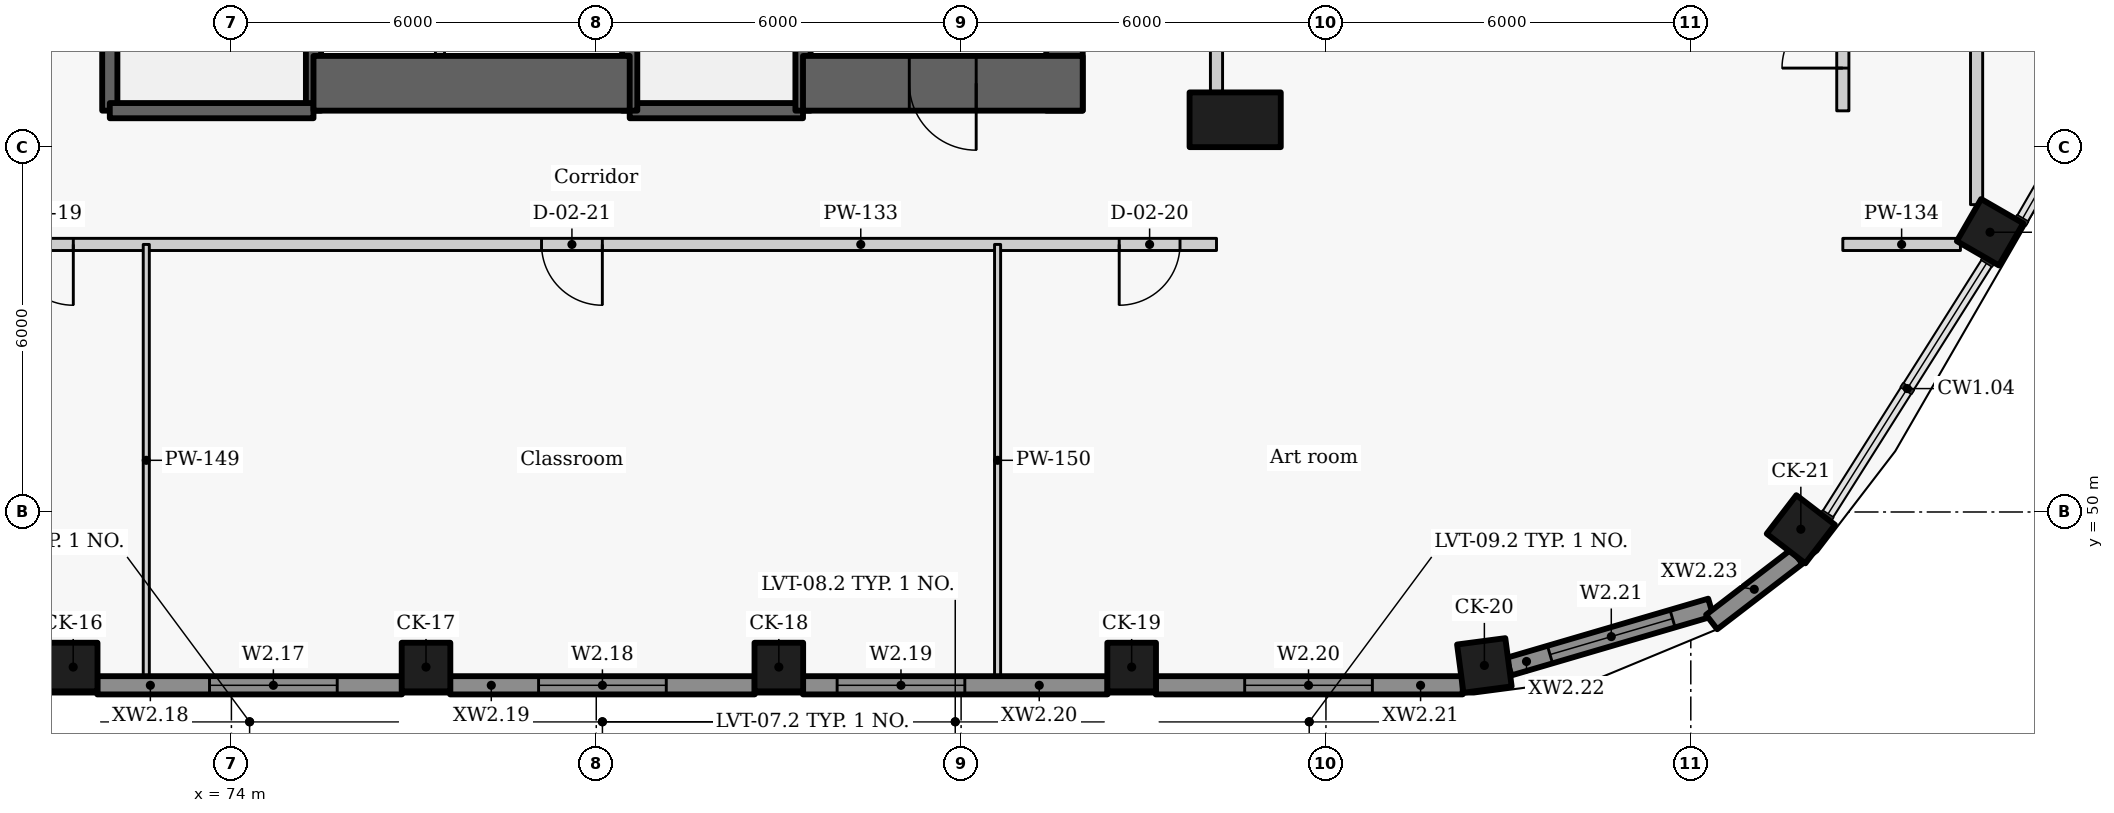
"""IFC4 building model, lengths in metres.
Left out: names, types, materials, properties, quantities, classifications, styles, units other than length and angle.
Written with IfcOpenShell. Run it as: python <this file> out.ifc"""

import sys

from ifc_helpers import new_model, si_unit, direction, frame, frame_2d, origin, origin_2d, place, context, subcontext, project, spatial, rectangle, extrude, element, fill, save


model = new_model("IFC4")
c1 = context("Model", 3, precision=1e-05, world=origin(), true_north=direction((0.0, 1.0)))
c2 = subcontext(c1, "Body", "Model", "MODEL_VIEW")
j1 = project(units=[si_unit("LENGTHUNIT", "METRE"), si_unit("PLANEANGLEUNIT", "RADIAN")], contexts=[c1])
p1 = place(None, origin())
s1 = spatial("IfcSite", under=j1, at=p1, CompositionType="ELEMENT")
p2 = place(p1, origin())
s2 = spatial("IfcBuilding", under=s1, at=p2, CompositionType="ELEMENT")
p3 = place(p2, frame((0.0, 0.0, 11.4)))
s3 = spatial("IfcBuildingStorey", under=s2, at=p3, CompositionType="ELEMENT", Elevation=11.4)
p4 = place(p3, frame((90.507, 56.45, 0.0), z_axis=(0.0, 0.0, 1.0), x_axis=(1.0, 0.0, 0.0)))
e1 = element("IfcColumn", 1, at=p4, inside=s3, PredefinedType="COLUMN", context=c2, shape_type="SweptSolid", body=[
    extrude(rectangle(XDim=1.5, YDim=0.9, at=origin_2d()), origin(), (0.0, 0.0, 1.0), 4.2),
])
for number, where, z_axis, x_axis in (
    (2, (71.398, 47.45, 0.0), (0.0, 0.0, 1.0), (1.0, 0.0, 0.0)),
    (3, (77.2, 47.45, 0.0), (0.0, 0.0, 1.0), (1.0, 0.0, 0.0)),
    (4, (83.002, 47.45, 0.0), (0.0, 0.0, 1.0), (1.0, 0.0, 0.0)),
    (5, (88.805, 47.45, 0.0), (0.0, 0.0, 1.0), (1.0, 0.0, 0.0)),
    (6, (94.605, 47.477, 0.0), (0.0, 0.0, 1.0), (0.991, 0.131, 0.0)),
    (7, (99.81, 49.716, 0.0), (0.0, 0.0, 1.0), (0.609, 0.793, 0.0)),
    (8, (102.921, 54.6, 0.0), (0.0, 0.0, 1.0), (0.5, 0.866, 0.0)),
):
    element("IfcColumn", number, at=place(p3, frame(where, z_axis=z_axis, x_axis=x_axis)), inside=s3, PredefinedType="COLUMN", context=c2, shape_type="SweptSolid", body=[
        extrude(rectangle(XDim=0.8, YDim=0.8, at=origin_2d()), origin(), (0.0, 0.0, 1.0), 4.2),
    ])
p5 = place(p3, frame((71.794, 47.15, 0.0), z_axis=(0.0, 0.0, 1.0), x_axis=(1.0, 0.0, 0.0)))
e9 = element("IfcWall", 9, at=p5, inside=s3, PredefinedType="SOLIDWALL", context=c2, shape_type="SweptSolid", body=[
    extrude(rectangle(XDim=5.01, YDim=0.3, at=frame_2d((2.505, 0.0))), origin(), (0.0, 0.0, 1.0), 3.0),
])
p6 = place(p5, frame((1.846, 0.0, 0.9)))
e10 = element("IfcOpeningElement", 10, at=p6, cuts=e9, PredefinedType="OPENING", context=c2, shape_type="SweptSolid", body=[
    extrude(rectangle(XDim=2.1, YDim=2.05, at=frame_2d((1.05, 1.025))), frame((0.0, 0.16, 0.0), z_axis=(0.0, -1.0, 0.0), x_axis=(1.0, 0.0, 0.0)), (0.0, 0.0, 1.0), 0.32),
])
p7 = place(p3, frame((77.596, 47.15, 0.0), z_axis=(0.0, 0.0, 1.0), x_axis=(1.0, 0.0, 0.0)))
e11 = element("IfcWall", 11, at=p7, inside=s3, PredefinedType="SOLIDWALL", context=c2, shape_type="SweptSolid", body=[
    extrude(rectangle(XDim=5.01, YDim=0.3, at=frame_2d((2.505, 0.0))), origin(), (0.0, 0.0, 1.0), 3.0),
])
p8 = place(p7, frame((1.455, 0.0, 0.9)))
e12 = element("IfcOpeningElement", 12, at=p8, cuts=e11, PredefinedType="OPENING", context=c2, shape_type="SweptSolid", body=[
    extrude(rectangle(XDim=2.1, YDim=2.05, at=frame_2d((1.05, 1.025))), frame((0.0, 0.16, 0.0), z_axis=(0.0, -1.0, 0.0), x_axis=(1.0, 0.0, 0.0)), (0.0, 0.0, 1.0), 0.32),
])
p9 = place(p3, frame((83.398, 47.15, 0.0), z_axis=(0.0, 0.0, 1.0), x_axis=(1.0, 0.0, 0.0)))
e13 = element("IfcWall", 13, at=p9, inside=s3, PredefinedType="SOLIDWALL", context=c2, shape_type="SweptSolid", body=[
    extrude(rectangle(XDim=5.01, YDim=0.3, at=frame_2d((2.505, 0.0))), origin(), (0.0, 0.0, 1.0), 3.0),
])
p10 = place(p9, frame((0.563, 0.0, 0.9)))
e14 = element("IfcOpeningElement", 14, at=p10, cuts=e13, PredefinedType="OPENING", context=c2, shape_type="SweptSolid", body=[
    extrude(rectangle(XDim=2.1, YDim=2.05, at=frame_2d((1.05, 1.025))), frame((0.0, 0.16, 0.0), z_axis=(0.0, -1.0, 0.0), x_axis=(1.0, 0.0, 0.0)), (0.0, 0.0, 1.0), 0.32),
])
p11 = place(p3, frame((89.201, 47.15, 0.0), z_axis=(0.0, 0.0, 1.0), x_axis=(1.0, 0.0, 0.0)))
e15 = element("IfcWall", 15, at=p11, inside=s3, PredefinedType="SOLIDWALL", context=c2, shape_type="SweptSolid", body=[
    extrude(rectangle(XDim=5.048, YDim=0.3, at=frame_2d((2.524, 0.0))), origin(), (0.0, 0.0, 1.0), 3.0),
])
p12 = place(p11, frame((1.463, 0.0, 0.9)))
e16 = element("IfcOpeningElement", 16, at=p12, cuts=e15, PredefinedType="OPENING", context=c2, shape_type="SweptSolid", body=[
    extrude(rectangle(XDim=2.1, YDim=2.05, at=frame_2d((1.05, 1.025))), frame((0.0, 0.16, 0.0), z_axis=(0.0, -1.0, 0.0), x_axis=(1.0, 0.0, 0.0)), (0.0, 0.0, 1.0), 0.32),
])
p13 = place(p3, frame((95.007, 47.457, 0.0), z_axis=(0.0, 0.0, 1.0), x_axis=(0.959578633815, 0.281440660756, 0.0)))
e17 = element("IfcWall", 17, at=p13, inside=s3, PredefinedType="SOLIDWALL", context=c2, shape_type="SweptSolid", body=[
    extrude(rectangle(XDim=3.461, YDim=0.3, at=frame_2d((1.73, 0.0))), origin(), (0.0, 0.0, 1.0), 3.0),
])
p14 = place(p13, frame((0.706, 0.0, 0.9)))
e18 = element("IfcOpeningElement", 18, at=p14, cuts=e17, PredefinedType="OPENING", context=c2, shape_type="SweptSolid", body=[
    extrude(rectangle(XDim=2.1, YDim=2.05, at=frame_2d((1.05, 1.025))), frame((0.0, 0.16, 0.0), z_axis=(0.0, -1.0, 0.0), x_axis=(1.0, 0.0, 0.0)), (0.0, 0.0, 1.0), 0.32),
])
p15 = place(p3, frame((98.343, 48.191, 0.0), z_axis=(0.0, 0.0, 1.0), x_axis=(0.793403972369, 0.608695438318, 0.0)))
e19 = element("IfcWall", 19, at=p15, inside=s3, PredefinedType="SOLIDWALL", context=c2, shape_type="SweptSolid", body=[
    extrude(rectangle(XDim=1.767, YDim=0.3, at=frame_2d((0.884, 0.0))), origin(), (0.0, 0.0, 1.0), 3.0),
])
p16 = place(p3, frame((87.7, 72.2, -0.3), z_axis=(0.0, 0.0, 1.0), x_axis=(0.0, -1.0, 0.0)))
e20 = element("IfcWall", 20, at=p16, inside=s3, PredefinedType="SHEAR", context=c2, shape_type="SweptSolid", body=[
    extrude(rectangle(XDim=15.6, YDim=0.6, at=frame_2d((7.8, 0.0))), origin(), (0.0, 0.0, 1.0), 4.2),
])
p17 = place(p16, frame((11.8, 0.0, 0.3)))
e21 = element("IfcOpeningElement", 21, at=p17, cuts=e20, PredefinedType="OPENING", context=c2, shape_type="SweptSolid", body=[
    extrude(rectangle(XDim=1.1, YDim=2.1, at=frame_2d((0.55, 1.05))), frame((0.0, 0.31, 0.0), z_axis=(0.0, -1.0, 0.0), x_axis=(1.0, 0.0, 0.0)), (0.0, 0.0, 1.0), 0.62),
])
p18 = place(p3, frame((75.35, 56.6, -0.3), z_axis=(0.0, 0.0, 1.0), x_axis=(0.0, 1.0, 0.0)))
e22 = element("IfcWall", 22, at=p18, inside=s3, PredefinedType="SHEAR", context=c2, shape_type="SweptSolid", body=[
    extrude(rectangle(XDim=5.003, YDim=0.25, at=frame_2d((2.501, 0.0))), origin(), (0.0, 0.0, 1.0), 4.2),
])
p19 = place(p3, frame((72.0, 56.6, -0.3), z_axis=(0.0, 0.0, 1.0), x_axis=(0.0, 1.0, 0.0)))
e23 = element("IfcWall", 23, at=p19, inside=s3, PredefinedType="SHEAR", context=c2, shape_type="SweptSolid", body=[
    extrude(rectangle(XDim=6.5, YDim=0.25, at=frame_2d((3.25, 0.0))), origin(), (0.0, 0.0, 1.0), 4.2),
])
p20 = place(p3, frame((72.0, 56.6, -0.3), z_axis=(0.0, 0.0, 1.0), x_axis=(1.0, 0.0, 0.0)))
e24 = element("IfcWall", 24, at=p20, inside=s3, PredefinedType="SHEAR", context=c2, shape_type="SweptSolid", body=[
    extrude(rectangle(XDim=3.35, YDim=0.25, at=frame_2d((1.675, 0.0))), origin(), (0.0, 0.0, 1.0), 4.2),
])
p21 = place(p3, frame((80.55, 56.6, -0.3), z_axis=(0.0, 0.0, 1.0), x_axis=(1.0, 0.0, 0.0)))
e25 = element("IfcWall", 25, at=p21, inside=s3, PredefinedType="SHEAR", context=c2, shape_type="SweptSolid", body=[
    extrude(rectangle(XDim=2.85, YDim=0.25, at=frame_2d((1.425, 0.0))), origin(), (0.0, 0.0, 1.0), 4.2),
])
p22 = place(p3, frame((83.4, 63.1, -0.3), z_axis=(0.0, 0.0, 1.0), x_axis=(0.0, -1.0, 0.0)))
e26 = element("IfcWall", 26, at=p22, inside=s3, PredefinedType="SHEAR", context=c2, shape_type="SweptSolid", body=[
    extrude(rectangle(XDim=6.5, YDim=0.25, at=frame_2d((3.25, 0.0))), origin(), (0.0, 0.0, 1.0), 4.2),
])
p23 = place(p22, frame((0.25, 0.0, 0.3)))
e27 = element("IfcOpeningElement", 27, at=p23, cuts=e26, PredefinedType="OPENING", context=c2, shape_type="SweptSolid", body=[
    extrude(rectangle(XDim=0.9, YDim=2.1, at=frame_2d((0.45, 1.05))), frame((0.0, 0.135, 0.0), z_axis=(0.0, -1.0, 0.0), x_axis=(1.0, 0.0, 0.0)), (0.0, 0.0, 1.0), 0.27),
])
p24 = place(p3, frame((80.55, 56.6, -0.3), z_axis=(0.0, 0.0, 1.0), x_axis=(0.0, 1.0, 0.0)))
e28 = element("IfcWall", 28, at=p24, inside=s3, PredefinedType="SHEAR", context=c2, shape_type="SweptSolid", body=[
    extrude(rectangle(XDim=5.003, YDim=0.25, at=frame_2d((2.501, 0.0))), origin(), (0.0, 0.0, 1.0), 4.2),
])
p25 = place(p3, frame((75.35, 57.05, -0.3), z_axis=(0.0, 0.0, 1.0), x_axis=(1.0, 0.0, 0.0)))
e29 = element("IfcWall", 29, at=p25, inside=s3, PredefinedType="SHEAR", context=c2, shape_type="SweptSolid", body=[
    extrude(rectangle(XDim=5.2, YDim=0.9, at=frame_2d((2.6, 0.0))), origin(), (0.0, 0.0, 1.0), 4.2),
])
p26 = place(p3, frame((88.0, 57.05, -0.3), z_axis=(0.0, 0.0, 1.0), x_axis=(-1.0, 0.0, 0.0)))
e30 = element("IfcWall", 30, at=p26, inside=s3, PredefinedType="SHEAR", context=c2, shape_type="SweptSolid", body=[
    extrude(rectangle(XDim=4.6, YDim=0.9, at=frame_2d((2.3, 0.0))), origin(), (0.0, 0.0, 1.0), 4.2),
])
p27 = place(p26, frame((1.752, 0.0, 0.3)))
e31 = element("IfcOpeningElement", 31, at=p27, cuts=e30, PredefinedType="OPENING", context=c2, shape_type="SweptSolid", body=[
    extrude(rectangle(XDim=1.1, YDim=2.1, at=frame_2d((0.55, 1.05))), frame((0.0, 0.46, 0.0), z_axis=(0.0, -1.0, 0.0), x_axis=(1.0, 0.0, 0.0)), (0.0, 0.0, 1.0), 0.92),
])
p28 = place(p3, frame((77.43, 56.6, 0.0), z_axis=(0.0, 0.0, 1.0), x_axis=(0.0, 1.0, 0.0)))
e32 = element("IfcWall", 32, at=p28, inside=s3, PredefinedType="PARTITIONING", context=c2, shape_type="SweptSolid", body=[
    extrude(rectangle(XDim=5.0, YDim=0.15, at=frame_2d((2.5, 0.0))), origin(), (0.0, 0.0, 1.0), 3.9),
])
p29 = place(p3, frame((102.7, 61.553, 0.0), z_axis=(0.0, 0.0, 1.0), x_axis=(0.0, -1.0, 0.0)))
e33 = element("IfcWall", 33, at=p29, inside=s3, PredefinedType="PARTITIONING", context=c2, shape_type="SweptSolid", body=[
    extrude(rectangle(XDim=6.499, YDim=0.2, at=frame_2d((3.249, 0.0))), origin(), (0.0, 0.0, 1.0), 3.9),
])
p30 = place(p29, frame((2.75, 0.0, 0.0)))
e34 = element("IfcOpeningElement", 34, at=p30, cuts=e33, PredefinedType="OPENING", context=c2, shape_type="SweptSolid", body=[
    extrude(rectangle(XDim=1.0, YDim=2.1, at=frame_2d((0.5, 1.05))), frame((0.0, 0.11, 0.0), z_axis=(0.0, -1.0, 0.0), x_axis=(1.0, 0.0, 0.0)), (0.0, 0.0, 1.0), 0.22),
])
p31 = place(p3, frame((100.5, 56.597, 0.0), z_axis=(0.0, 0.0, 1.0), x_axis=(0.0, 1.0, 0.0)))
e35 = element("IfcWall", 35, at=p31, inside=s3, PredefinedType="PARTITIONING", context=c2, shape_type="SweptSolid", body=[
    extrude(rectangle(XDim=10.873, YDim=0.2, at=frame_2d((5.437, 0.0))), origin(), (0.0, 0.0, 1.0), 3.9),
])
p32 = place(p31, frame((5.003, 0.0, 0.0)))
e36 = element("IfcOpeningElement", 36, at=p32, cuts=e35, PredefinedType="OPENING", context=c2, shape_type="SweptSolid", body=[
    extrude(rectangle(XDim=1.0, YDim=2.1, at=frame_2d((0.5, 1.05))), frame((0.0, 0.11, 0.0), z_axis=(0.0, -1.0, 0.0), x_axis=(1.0, 0.0, 0.0)), (0.0, 0.0, 1.0), 0.22),
])
p33 = place(p31, frame((0.703, 0.0, 0.0)))
e37 = element("IfcOpeningElement", 37, at=p33, cuts=e35, PredefinedType="OPENING", context=c2, shape_type="SweptSolid", body=[
    extrude(rectangle(XDim=1.0, YDim=2.1, at=frame_2d((0.5, 1.05))), frame((0.0, 0.11, 0.0), z_axis=(0.0, -1.0, 0.0), x_axis=(1.0, 0.0, 0.0)), (0.0, 0.0, 1.0), 0.22),
])
p34 = place(p3, frame((90.2, 56.917, 0.0), z_axis=(0.0, 0.0, 1.0), x_axis=(0.0, 1.0, 0.0)))
e38 = element("IfcWall", 38, at=p34, inside=s3, PredefinedType="PARTITIONING", context=c2, shape_type="SweptSolid", body=[
    extrude(rectangle(XDim=1.516, YDim=0.2, at=frame_2d((0.758, 0.0))), origin(), (0.0, 0.0, 1.0), 3.9),
])
p35 = place(p3, frame((90.2, 54.4, 0.0), z_axis=(0.0, 0.0, 1.0), x_axis=(-1.0, 0.0, 0.0)))
e39 = element("IfcWall", 39, at=p35, inside=s3, PredefinedType="PARTITIONING", context=c2, shape_type="SweptSolid", body=[
    extrude(rectangle(XDim=20.4, YDim=0.2, at=frame_2d((10.2, 0.0))), origin(), (0.0, 0.0, 1.0), 3.9),
])
p36 = place(p35, frame((18.8, 0.0, 0.0)))
e40 = element("IfcOpeningElement", 40, at=p36, cuts=e39, PredefinedType="OPENING", context=c2, shape_type="SweptSolid", body=[
    extrude(rectangle(XDim=1.0, YDim=2.1, at=frame_2d((0.5, 1.05))), frame((0.0, 0.11, 0.0), z_axis=(0.0, -1.0, 0.0), x_axis=(1.0, 0.0, 0.0)), (0.0, 0.0, 1.0), 0.22),
])
p37 = place(p35, frame((0.6, 0.0, 0.0)))
e41 = element("IfcOpeningElement", 41, at=p37, cuts=e39, PredefinedType="OPENING", context=c2, shape_type="SweptSolid", body=[
    extrude(rectangle(XDim=1.0, YDim=2.1, at=frame_2d((0.5, 1.05))), frame((0.0, 0.11, 0.0), z_axis=(0.0, -1.0, 0.0), x_axis=(1.0, 0.0, 0.0)), (0.0, 0.0, 1.0), 0.22),
])
p38 = place(p35, frame((10.1, 0.0, 0.0)))
e42 = element("IfcOpeningElement", 42, at=p38, cuts=e39, PredefinedType="OPENING", context=c2, shape_type="SweptSolid", body=[
    extrude(rectangle(XDim=1.0, YDim=2.1, at=frame_2d((0.5, 1.05))), frame((0.0, 0.11, 0.0), z_axis=(0.0, -1.0, 0.0), x_axis=(1.0, 0.0, 0.0)), (0.0, 0.0, 1.0), 0.22),
])
p39 = place(p3, frame((100.5, 54.4, 0.0), z_axis=(0.0, 0.0, 1.0), x_axis=(1.0, 0.0, 0.0)))
e43 = element("IfcWall", 43, at=p39, inside=s3, PredefinedType="PARTITIONING", context=c2, shape_type="SweptSolid", body=[
    extrude(rectangle(XDim=1.934, YDim=0.2, at=frame_2d((0.967, 0.0))), origin(), (0.0, 0.0, 1.0), 3.9),
])
for number, where, z_axis, x_axis in (
    (44, (72.6, 47.3, 0.0), (0.0, 0.0, 1.0), (0.0, 1.0, 0.0)),
    (45, (86.6, 47.3, 0.0), (0.0, 0.0, 1.0), (0.0, 1.0, 0.0)),
):
    element("IfcWall", number, at=place(p3, frame(where, z_axis=z_axis, x_axis=x_axis)), inside=s3, PredefinedType="PARTITIONING", context=c2, shape_type="SweptSolid", body=[
        extrude(rectangle(XDim=7.1, YDim=0.1, at=frame_2d((3.55, 0.0))), origin(), (0.0, 0.0, 1.0), 3.13),
    ])
p40 = place(p6, origin())
e46 = element("IfcWindow", 46, at=p40, inside=s3, PartitioningType="SINGLE_PANEL", PredefinedType="WINDOW", context=c2, shape_type="SweptSolid", body=[
    extrude(rectangle(XDim=2.1, YDim=2.05, at=frame_2d((1.05, 1.025))), frame((0.0, 0.03, 0.0), z_axis=(0.0, -1.0, 0.0), x_axis=(1.0, 0.0, 0.0)), (0.0, 0.0, 1.0), 0.06),
])
fill(e10, e46)
p41 = place(p8, origin())
e47 = element("IfcWindow", 47, at=p41, inside=s3, PartitioningType="SINGLE_PANEL", PredefinedType="WINDOW", context=c2, shape_type="SweptSolid", body=[
    extrude(rectangle(XDim=2.1, YDim=2.05, at=frame_2d((1.05, 1.025))), frame((0.0, 0.03, 0.0), z_axis=(0.0, -1.0, 0.0), x_axis=(1.0, 0.0, 0.0)), (0.0, 0.0, 1.0), 0.06),
])
fill(e12, e47)
p42 = place(p10, origin())
e48 = element("IfcWindow", 48, at=p42, inside=s3, PartitioningType="SINGLE_PANEL", PredefinedType="WINDOW", context=c2, shape_type="SweptSolid", body=[
    extrude(rectangle(XDim=2.1, YDim=2.05, at=frame_2d((1.05, 1.025))), frame((0.0, 0.03, 0.0), z_axis=(0.0, -1.0, 0.0), x_axis=(1.0, 0.0, 0.0)), (0.0, 0.0, 1.0), 0.06),
])
fill(e14, e48)
p43 = place(p12, origin())
e49 = element("IfcWindow", 49, at=p43, inside=s3, PartitioningType="SINGLE_PANEL", PredefinedType="WINDOW", context=c2, shape_type="SweptSolid", body=[
    extrude(rectangle(XDim=2.1, YDim=2.05, at=frame_2d((1.05, 1.025))), frame((0.0, 0.03, 0.0), z_axis=(0.0, -1.0, 0.0), x_axis=(1.0, 0.0, 0.0)), (0.0, 0.0, 1.0), 0.06),
])
fill(e16, e49)
p44 = place(p14, origin())
e50 = element("IfcWindow", 50, at=p44, inside=s3, PartitioningType="SINGLE_PANEL", PredefinedType="WINDOW", context=c2, shape_type="SweptSolid", body=[
    extrude(rectangle(XDim=2.1, YDim=2.05, at=frame_2d((1.05, 1.025))), frame((0.0, 0.03, 0.0), z_axis=(0.0, -1.0, 0.0), x_axis=(1.0, 0.0, 0.0)), (0.0, 0.0, 1.0), 0.06),
])
fill(e18, e50)
p45 = place(p33, origin())
e51 = element("IfcDoor", 51, at=p45, inside=s3, OperationType="SINGLE_SWING_LEFT", PredefinedType="DOOR", context=c2, shape_type="SweptSolid", body=[
    extrude(rectangle(XDim=1.0, YDim=2.1, at=frame_2d((0.5, 1.05))), frame((0.0, 0.025, 0.0), z_axis=(0.0, -1.0, 0.0), x_axis=(1.0, 0.0, 0.0)), (0.0, 0.0, 1.0), 0.05),
])
fill(e37, e51)
p46 = place(p36, origin())
e52 = element("IfcDoor", 52, at=p46, inside=s3, OperationType="SINGLE_SWING_LEFT", PredefinedType="DOOR", context=c2, shape_type="SweptSolid", body=[
    extrude(rectangle(XDim=1.0, YDim=2.1, at=frame_2d((0.5, 1.05))), frame((0.0, 0.025, 0.0), z_axis=(0.0, -1.0, 0.0), x_axis=(1.0, 0.0, 0.0)), (0.0, 0.0, 1.0), 0.05),
])
fill(e40, e52)
p47 = place(p37, origin())
e53 = element("IfcDoor", 53, at=p47, inside=s3, OperationType="SINGLE_SWING_RIGHT", PredefinedType="DOOR", context=c2, shape_type="SweptSolid", body=[
    extrude(rectangle(XDim=1.0, YDim=2.1, at=frame_2d((0.5, 1.05))), frame((0.0, 0.025, 0.0), z_axis=(0.0, -1.0, 0.0), x_axis=(1.0, 0.0, 0.0)), (0.0, 0.0, 1.0), 0.05),
])
fill(e41, e53)
p48 = place(p38, origin())
e54 = element("IfcDoor", 54, at=p48, inside=s3, OperationType="SINGLE_SWING_LEFT", PredefinedType="DOOR", context=c2, shape_type="SweptSolid", body=[
    extrude(rectangle(XDim=1.0, YDim=2.1, at=frame_2d((0.5, 1.05))), frame((0.0, 0.025, 0.0), z_axis=(0.0, -1.0, 0.0), x_axis=(1.0, 0.0, 0.0)), (0.0, 0.0, 1.0), 0.05),
])
fill(e42, e54)
p49 = place(p27, origin())
e55 = element("IfcDoor", 55, at=p49, inside=s3, OperationType="SINGLE_SWING_LEFT", PredefinedType="DOOR", context=c2, shape_type="SweptSolid", body=[
    extrude(rectangle(XDim=1.1, YDim=2.1, at=frame_2d((0.55, 1.05))), frame((0.0, 0.025, 0.0), z_axis=(0.0, -1.0, 0.0), x_axis=(1.0, 0.0, 0.0)), (0.0, 0.0, 1.0), 0.05),
])
fill(e31, e55)
save(model, sys.argv[1])
